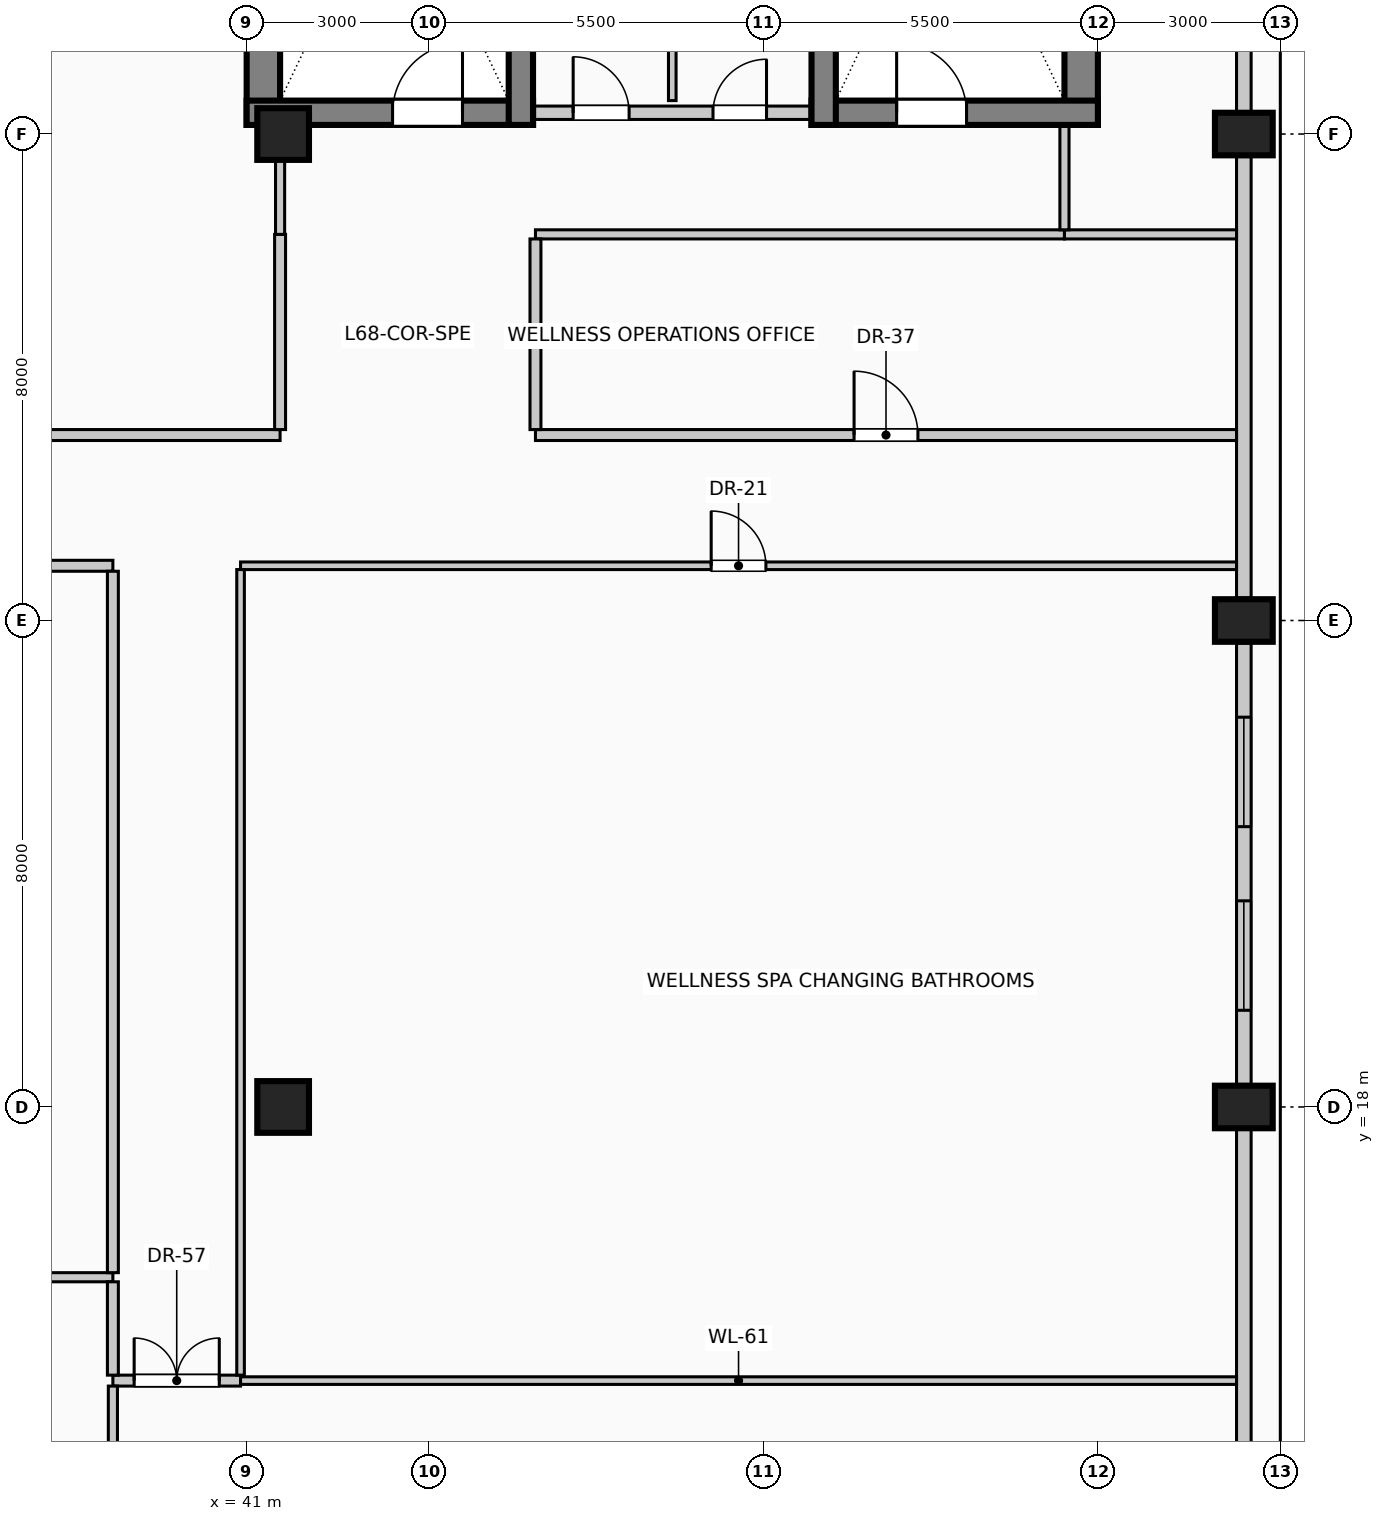
"""IFC4 building model, lengths in metres.
Left out: names, types, materials, properties, quantities, classifications, styles, units other than length and angle.
Written with IfcOpenShell. Run it as: python <this file> out.ifc"""

import sys

from ifc_helpers import new_model, si_unit, direction, frame, frame_2d, origin, origin_2d, place, context, subcontext, project, spatial, rectangle, circle, extrude, element, fill, save


model = new_model("IFC4")
c1 = context("Model", 3, precision=1e-05, world=origin(), true_north=direction((0.0, 1.0)))
c2 = subcontext(c1, "Body", "Model", "MODEL_VIEW")
j1 = project(units=[si_unit("LENGTHUNIT", "METRE"), si_unit("PLANEANGLEUNIT", "RADIAN")], contexts=[c1])
p1 = place(None, origin())
s1 = spatial("IfcSite", under=j1, at=p1, CompositionType="ELEMENT")
p2 = place(p1, origin())
s2 = spatial("IfcBuilding", under=s1, at=p2, CompositionType="ELEMENT")
p3 = place(p2, frame((0.0, 0.0, 280.6)))
s3 = spatial("IfcBuildingStorey", under=s2, at=p3, CompositionType="ELEMENT", Elevation=280.6)
for number, where, z_axis, x_axis in (
    (1, (41.275, 34.15, 0.0), (0.0, 0.0, 1.0), (0.0, 1.0, 0.0)),
    (2, (54.725, 34.15, 0.0), (0.0, 0.0, 1.0), (0.0, 1.0, 0.0)),
):
    element("IfcWall", number, at=place(p3, frame(where, z_axis=z_axis, x_axis=x_axis)), inside=s3, PredefinedType="SHEAR", context=c2, shape_type="SweptSolid", body=[
        extrude(rectangle(XDim=8.83, YDim=0.55, at=frame_2d((4.415, 0.0))), origin(), (0.0, 0.0, 1.0), 4.4),
    ])
p4 = place(p3, frame((41.0, 34.35, 0.0), z_axis=(0.0, 0.0, 1.0), x_axis=(1.0, 0.0, 0.0)))
e3 = element("IfcWall", 3, at=p4, inside=s3, PredefinedType="SHEAR", context=c2, shape_type="SweptSolid", body=[
    extrude(rectangle(XDim=4.71, YDim=0.4, at=frame_2d((2.355, 0.0))), origin(), (0.0, 0.0, 1.0), 4.4),
])
p5 = place(p4, frame((2.4, 0.0, 0.0)))
e4 = element("IfcOpeningElement", 4, at=p5, cuts=e3, PredefinedType="OPENING", context=c2, shape_type="SweptSolid", body=[
    extrude(rectangle(XDim=1.15, YDim=2.2, at=frame_2d((0.575, 1.1))), frame((0.0, 0.21, 0.0), z_axis=(0.0, -1.0, 0.0), x_axis=(1.0, 0.0, 0.0)), (0.0, 0.0, 1.0), 0.42),
])
p6 = place(p3, frame((45.51, 34.15, 0.0), z_axis=(0.0, 0.0, 1.0), x_axis=(0.0, 1.0, 0.0)))
e5 = element("IfcWall", 5, at=p6, inside=s3, PredefinedType="SHEAR", context=c2, shape_type="SweptSolid", body=[
    extrude(rectangle(XDim=8.83, YDim=0.4, at=frame_2d((4.415, 0.0))), origin(), (0.0, 0.0, 1.0), 4.4),
])
p7 = place(p3, frame((50.29, 34.35, 0.0), z_axis=(0.0, 0.0, 1.0), x_axis=(1.0, 0.0, 0.0)))
e6 = element("IfcWall", 6, at=p7, inside=s3, PredefinedType="SHEAR", context=c2, shape_type="SweptSolid", body=[
    extrude(rectangle(XDim=4.71, YDim=0.4, at=frame_2d((2.355, 0.0))), origin(), (0.0, 0.0, 1.0), 4.4),
])
p8 = place(p7, frame((1.4, 0.0, 0.0)))
e7 = element("IfcOpeningElement", 7, at=p8, cuts=e6, PredefinedType="OPENING", context=c2, shape_type="SweptSolid", body=[
    extrude(rectangle(XDim=1.15, YDim=2.2, at=frame_2d((0.575, 1.1))), frame((0.0, 0.21, 0.0), z_axis=(0.0, -1.0, 0.0), x_axis=(1.0, 0.0, 0.0)), (0.0, 0.0, 1.0), 0.42),
])
p9 = place(p3, frame((50.49, 34.15, 0.0), z_axis=(0.0, 0.0, 1.0), x_axis=(0.0, 1.0, 0.0)))
e8 = element("IfcWall", 8, at=p9, inside=s3, PredefinedType="SHEAR", context=c2, shape_type="SweptSolid", body=[
    extrude(rectangle(XDim=8.83, YDim=0.4, at=frame_2d((4.415, 0.0))), origin(), (0.0, 0.0, 1.0), 4.4),
])
for number, where, z_axis, x_axis in (
    (9, (57.4, 18.0, 0.0), (0.0, 0.0, 1.0), (0.0, 1.0, 0.0)),
    (10, (57.4, 26.0, 0.0), (0.0, 0.0, 1.0), (0.0, 1.0, 0.0)),
    (11, (57.4, 34.0, 0.0), (0.0, 0.0, 1.0), (0.0, 1.0, 0.0)),
):
    element("IfcColumn", number, at=place(p3, frame(where, z_axis=z_axis, x_axis=x_axis)), inside=s3, PredefinedType="COLUMN", context=c2, shape_type="SweptSolid", body=[
        extrude(rectangle(XDim=0.7, YDim=0.95, at=origin_2d()), origin(), (0.0, 0.0, 1.0), 4.4),
    ])
for number, where, z_axis, x_axis in (
    (12, (41.6, 18.0, 0.0), (0.0, 0.0, 1.0), (1.0, 0.0, 0.0)),
    (13, (41.6, 34.0, 0.0), (0.0, 0.0, 1.0), (1.0, 0.0, 0.0)),
):
    element("IfcColumn", number, at=place(p3, frame(where, z_axis=z_axis, x_axis=x_axis)), inside=s3, PredefinedType="COLUMN", context=c2, shape_type="SweptSolid", body=[
        extrude(circle(Radius=0.425, at=origin_2d()), origin(), (0.0, 0.0, 1.0), 4.4),
    ])
p10 = place(p3, frame((57.4, 17.63, 0.0), z_axis=(0.0, 0.0, 1.0), x_axis=(0.0, -1.0, 0.0)))
e14 = element("IfcWall", 14, at=p10, inside=s3, PredefinedType="SOLIDWALL", context=c2, shape_type="SweptSolid", body=[
    extrude(rectangle(XDim=7.26, YDim=0.24, at=frame_2d((3.63, 0.0))), origin(), (0.0, 0.0, 1.0), 3.4),
])
p11 = place(p3, frame((57.4, 25.63, 0.0), z_axis=(0.0, 0.0, 1.0), x_axis=(0.0, -1.0, 0.0)))
e15 = element("IfcWall", 15, at=p11, inside=s3, PredefinedType="SOLIDWALL", context=c2, shape_type="SweptSolid", body=[
    extrude(rectangle(XDim=7.26, YDim=0.24, at=frame_2d((3.63, 0.0))), origin(), (0.0, 0.0, 1.0), 3.4),
])
p12 = place(p11, frame((1.22, 0.0, 0.42)))
e16 = element("IfcOpeningElement", 16, at=p12, cuts=e15, PredefinedType="OPENING", context=c2, shape_type="SweptSolid", body=[
    extrude(rectangle(XDim=1.8, YDim=2.2, at=frame_2d((0.9, 1.1))), frame((0.0, 0.13, 0.0), z_axis=(0.0, -1.0, 0.0), x_axis=(1.0, 0.0, 0.0)), (0.0, 0.0, 1.0), 0.26),
])
p13 = place(p11, frame((4.24, 0.0, 0.42)))
e17 = element("IfcOpeningElement", 17, at=p13, cuts=e15, PredefinedType="OPENING", context=c2, shape_type="SweptSolid", body=[
    extrude(rectangle(XDim=1.8, YDim=2.2, at=frame_2d((0.9, 1.1))), frame((0.0, 0.13, 0.0), z_axis=(0.0, -1.0, 0.0), x_axis=(1.0, 0.0, 0.0)), (0.0, 0.0, 1.0), 0.26),
])
p14 = place(p3, frame((57.4, 33.63, 0.0), z_axis=(0.0, 0.0, 1.0), x_axis=(0.0, -1.0, 0.0)))
e18 = element("IfcWall", 18, at=p14, inside=s3, PredefinedType="SOLIDWALL", context=c2, shape_type="SweptSolid", body=[
    extrude(rectangle(XDim=7.26, YDim=0.24, at=frame_2d((3.63, 0.0))), origin(), (0.0, 0.0, 1.0), 3.4),
])
p15 = place(p3, frame((57.4, 42.03, 0.0), z_axis=(0.0, 0.0, 1.0), x_axis=(0.0, -1.0, 0.0)))
e19 = element("IfcWall", 19, at=p15, inside=s3, PredefinedType="SOLIDWALL", context=c2, shape_type="SweptSolid", body=[
    extrude(rectangle(XDim=7.66, YDim=0.24, at=frame_2d((3.83, 0.0))), origin(), (0.0, 0.0, 1.0), 3.4),
])
p16 = place(p3, frame((45.72, 34.35, 0.0), z_axis=(0.0, 0.0, 1.0), x_axis=(1.0, 0.0, 0.0)))
e20 = element("IfcWall", 20, at=p16, inside=s3, PredefinedType="PARTITIONING", context=c2, shape_type="SweptSolid", body=[
    extrude(rectangle(XDim=4.56, YDim=0.22, at=frame_2d((2.28, 0.0))), origin(), (0.0, 0.0, 1.0), 4.15),
])
p17 = place(p16, frame((0.65, 0.0, 0.0)))
e21 = element("IfcOpeningElement", 21, at=p17, cuts=e20, PredefinedType="OPENING", context=c2, shape_type="SweptSolid", body=[
    extrude(rectangle(XDim=0.92, YDim=2.1, at=frame_2d((0.46, 1.05))), frame((0.0, 0.12, 0.0), z_axis=(0.0, -1.0, 0.0), x_axis=(1.0, 0.0, 0.0)), (0.0, 0.0, 1.0), 0.24),
])
p18 = place(p16, frame((2.95, 0.0, 0.0)))
e22 = element("IfcOpeningElement", 22, at=p18, cuts=e20, PredefinedType="OPENING", context=c2, shape_type="SweptSolid", body=[
    extrude(rectangle(XDim=0.88, YDim=2.1, at=frame_2d((0.44, 1.05))), frame((0.0, 0.12, 0.0), z_axis=(0.0, -1.0, 0.0), x_axis=(1.0, 0.0, 0.0)), (0.0, 0.0, 1.0), 0.24),
])
p19 = place(p3, frame((38.8, 13.5, 0.0), z_axis=(0.0, 0.0, 1.0), x_axis=(1.0, 0.0, 0.0)))
e23 = element("IfcWall", 23, at=p19, inside=s3, PredefinedType="PARTITIONING", context=c2, shape_type="SweptSolid", body=[
    extrude(rectangle(XDim=2.1, YDim=0.18, at=frame_2d((1.05, 0.0))), origin(), (0.0, 0.0, 1.0), 4.15),
])
p20 = place(p19, frame((0.35, 0.0, 0.0)))
e24 = element("IfcOpeningElement", 24, at=p20, cuts=e23, PredefinedType="OPENING", context=c2, shape_type="SweptSolid", body=[
    extrude(rectangle(XDim=1.4, YDim=2.2, at=frame_2d((0.7, 1.1))), frame((0.0, 0.1, 0.0), z_axis=(0.0, -1.0, 0.0), x_axis=(1.0, 0.0, 0.0)), (0.0, 0.0, 1.0), 0.2),
])
p21 = place(p3, frame((40.9, 13.5, 0.0), z_axis=(0.0, 0.0, 1.0), x_axis=(1.0, 0.0, 0.0)))
e25 = element("IfcWall", 25, at=p21, inside=s3, PredefinedType="PARTITIONING", context=c2, shape_type="SweptSolid", body=[
    extrude(rectangle(XDim=16.38, YDim=0.125, at=frame_2d((8.19, 0.0))), origin(), (0.0, 0.0, 1.0), 4.15),
])
p22 = place(p3, frame((23.1, 15.2, 0.0), z_axis=(0.0, 0.0, 1.0), x_axis=(1.0, 0.0, 0.0)))
e26 = element("IfcWall", 26, at=p22, inside=s3, PredefinedType="PARTITIONING", context=c2, shape_type="SweptSolid", body=[
    extrude(rectangle(XDim=15.7, YDim=0.15, at=frame_2d((7.85, 0.0))), origin(), (0.0, 0.0, 1.0), 4.15),
])
p23 = place(p3, frame((23.1, 26.9, 0.0), z_axis=(0.0, 0.0, 1.0), x_axis=(1.0, 0.0, 0.0)))
e27 = element("IfcWall", 27, at=p23, inside=s3, PredefinedType="PARTITIONING", context=c2, shape_type="SweptSolid", body=[
    extrude(rectangle(XDim=15.7, YDim=0.18, at=frame_2d((7.85, 0.0))), origin(), (0.0, 0.0, 1.0), 4.15),
])
p24 = place(p23, frame((7.375, 0.0, 0.0)))
e28 = element("IfcOpeningElement", 28, at=p24, cuts=e27, PredefinedType="OPENING", context=c2, shape_type="SweptSolid", body=[
    extrude(rectangle(XDim=0.95, YDim=2.15, at=frame_2d((0.475, 1.075))), frame((0.0, 0.1, 0.0), z_axis=(0.0, -1.0, 0.0), x_axis=(1.0, 0.0, 0.0)), (0.0, 0.0, 1.0), 0.2),
])
p25 = place(p3, frame((40.9, 26.9, 0.0), z_axis=(0.0, 0.0, 1.0), x_axis=(1.0, 0.0, 0.0)))
e29 = element("IfcWall", 29, at=p25, inside=s3, PredefinedType="PARTITIONING", context=c2, shape_type="SweptSolid", body=[
    extrude(rectangle(XDim=16.38, YDim=0.125, at=frame_2d((8.19, 0.0))), origin(), (0.0, 0.0, 1.0), 4.15),
])
p26 = place(p25, frame((7.74, 0.0, 0.0)))
e30 = element("IfcOpeningElement", 30, at=p26, cuts=e29, PredefinedType="OPENING", context=c2, shape_type="SweptSolid", body=[
    extrude(rectangle(XDim=0.9, YDim=2.1, at=frame_2d((0.45, 1.05))), frame((0.0, 0.073, 0.0), z_axis=(0.0, -1.0, 0.0), x_axis=(1.0, 0.0, 0.0)), (0.0, 0.0, 1.0), 0.145),
])
p27 = place(p3, frame((21.0, 29.05, 0.0), z_axis=(0.0, 0.0, 1.0), x_axis=(1.0, 0.0, 0.0)))
e31 = element("IfcWall", 31, at=p27, inside=s3, PredefinedType="PARTITIONING", context=c2, shape_type="SweptSolid", body=[
    extrude(rectangle(XDim=20.55, YDim=0.18, at=frame_2d((10.275, 0.0))), origin(), (0.0, 0.0, 1.0), 4.15),
])
p28 = place(p27, frame((9.8, 0.0, 0.0)))
e32 = element("IfcOpeningElement", 32, at=p28, cuts=e31, PredefinedType="OPENING", context=c2, shape_type="SweptSolid", body=[
    extrude(rectangle(XDim=0.95, YDim=2.15, at=frame_2d((0.475, 1.075))), frame((0.0, 0.1, 0.0), z_axis=(0.0, -1.0, 0.0), x_axis=(1.0, 0.0, 0.0)), (0.0, 0.0, 1.0), 0.2),
])
p29 = place(p3, frame((45.75, 29.05, 0.0), z_axis=(0.0, 0.0, 1.0), x_axis=(1.0, 0.0, 0.0)))
e33 = element("IfcWall", 33, at=p29, inside=s3, PredefinedType="PARTITIONING", context=c2, shape_type="SweptSolid", body=[
    extrude(rectangle(XDim=11.53, YDim=0.18, at=frame_2d((5.765, 0.0))), origin(), (0.0, 0.0, 1.0), 4.15),
])
p30 = place(p29, frame((5.24, 0.0, 0.0)))
e34 = element("IfcOpeningElement", 34, at=p30, cuts=e33, PredefinedType="OPENING", context=c2, shape_type="SweptSolid", body=[
    extrude(rectangle(XDim=1.05, YDim=2.15, at=frame_2d((0.525, 1.075))), frame((0.0, 0.1, 0.0), z_axis=(0.0, -1.0, 0.0), x_axis=(1.0, 0.0, 0.0)), (0.0, 0.0, 1.0), 0.2),
])
p31 = place(p3, frame((45.75, 32.35, 0.0), z_axis=(0.0, 0.0, 1.0), x_axis=(1.0, 0.0, 0.0)))
e35 = element("IfcWall", 35, at=p31, inside=s3, PredefinedType="PARTITIONING", context=c2, shape_type="SweptSolid", body=[
    extrude(rectangle(XDim=8.7, YDim=0.15, at=frame_2d((4.35, 0.0))), origin(), (0.0, 0.0, 1.0), 4.15),
])
p32 = place(p3, frame((54.45, 32.35, 0.0), z_axis=(0.0, 0.0, 1.0), x_axis=(1.0, 0.0, 0.0)))
e36 = element("IfcWall", 36, at=p32, inside=s3, PredefinedType="PARTITIONING", context=c2, shape_type="SweptSolid", body=[
    extrude(rectangle(XDim=2.83, YDim=0.15, at=frame_2d((1.415, 0.0))), origin(), (0.0, 0.0, 1.0), 4.15),
])
p33 = place(p3, frame((38.8, 0.6, 0.0), z_axis=(0.0, 0.0, 1.0), x_axis=(0.0, 1.0, 0.0)))
e37 = element("IfcWall", 37, at=p33, inside=s3, PredefinedType="PARTITIONING", context=c2, shape_type="SweptSolid", body=[
    extrude(rectangle(XDim=12.81, YDim=0.15, at=frame_2d((6.405, 0.0))), origin(), (0.0, 0.0, 1.0), 4.15),
])
p34 = place(p3, frame((38.8, 13.59, 0.0), z_axis=(0.0, 0.0, 1.0), x_axis=(0.0, 1.0, 0.0)))
e38 = element("IfcWall", 38, at=p34, inside=s3, PredefinedType="PARTITIONING", context=c2, shape_type="SweptSolid", body=[
    extrude(rectangle(XDim=1.535, YDim=0.18, at=frame_2d((0.768, 0.0))), origin(), (0.0, 0.0, 1.0), 4.15),
])
p35 = place(p3, frame((38.8, 15.275, 0.0), z_axis=(0.0, 0.0, 1.0), x_axis=(0.0, 1.0, 0.0)))
e39 = element("IfcWall", 39, at=p35, inside=s3, PredefinedType="PARTITIONING", context=c2, shape_type="SweptSolid", body=[
    extrude(rectangle(XDim=11.535, YDim=0.18, at=frame_2d((5.768, 0.0))), origin(), (0.0, 0.0, 1.0), 4.15),
])
p36 = place(p3, frame((40.9, 13.59, 0.0), z_axis=(0.0, 0.0, 1.0), x_axis=(0.0, 1.0, 0.0)))
e40 = element("IfcWall", 40, at=p36, inside=s3, PredefinedType="PARTITIONING", context=c2, shape_type="SweptSolid", body=[
    extrude(rectangle(XDim=13.247, YDim=0.125, at=frame_2d((6.624, 0.0))), origin(), (0.0, 0.0, 1.0), 4.15),
])
p37 = place(p3, frame((41.55, 29.14, 0.0), z_axis=(0.0, 0.0, 1.0), x_axis=(0.0, 1.0, 0.0)))
e41 = element("IfcWall", 41, at=p37, inside=s3, PredefinedType="PARTITIONING", context=c2, shape_type="SweptSolid", body=[
    extrude(rectangle(XDim=3.21, YDim=0.18, at=frame_2d((1.605, 0.0))), origin(), (0.0, 0.0, 1.0), 3.595),
])
p38 = place(p3, frame((41.55, 32.35, 0.0), z_axis=(0.0, 0.0, 1.0), x_axis=(0.0, 1.0, 0.0)))
e42 = element("IfcWall", 42, at=p38, inside=s3, PredefinedType="PARTITIONING", context=c2, shape_type="SweptSolid", body=[
    extrude(rectangle(XDim=1.225, YDim=0.15, at=frame_2d((0.612, 0.0))), origin(), (0.0, 0.0, 1.0), 3.595),
])
p39 = place(p3, frame((45.75, 29.14, 0.0), z_axis=(0.0, 0.0, 1.0), x_axis=(0.0, 1.0, 0.0)))
e43 = element("IfcWall", 43, at=p39, inside=s3, PredefinedType="PARTITIONING", context=c2, shape_type="SweptSolid", body=[
    extrude(rectangle(XDim=3.135, YDim=0.18, at=frame_2d((1.567, 0.0))), origin(), (0.0, 0.0, 1.0), 4.15),
])
p40 = place(p3, frame((48.0, 34.55, 0.0), z_axis=(0.0, 0.0, 1.0), x_axis=(0.0, 1.0, 0.0)))
e44 = element("IfcWall", 44, at=p40, inside=s3, PredefinedType="PARTITIONING", context=c2, shape_type="SweptSolid", body=[
    extrude(rectangle(XDim=7.475, YDim=0.125, at=frame_2d((3.737, 0.0))), origin(), (0.0, 0.0, 1.0), 4.15),
])
p41 = place(p3, frame((54.45, 32.425, 0.0), z_axis=(0.0, 0.0, 1.0), x_axis=(0.0, 1.0, 0.0)))
e45 = element("IfcWall", 45, at=p41, inside=s3, PredefinedType="PARTITIONING", context=c2, shape_type="SweptSolid", body=[
    extrude(rectangle(XDim=1.725, YDim=0.15, at=frame_2d((0.862, 0.0))), origin(), (0.0, 0.0, 1.0), 4.15),
])
p42 = place(p12, origin())
e46 = element("IfcWindow", 46, at=p42, inside=s3, PartitioningType="SINGLE_PANEL", PredefinedType="WINDOW", context=c2, shape_type="SweptSolid", body=[
    extrude(rectangle(XDim=1.8, YDim=2.2, at=frame_2d((0.9, 1.1))), frame((0.0, 0.03, 0.0), z_axis=(0.0, -1.0, 0.0), x_axis=(1.0, 0.0, 0.0)), (0.0, 0.0, 1.0), 0.06),
])
fill(e16, e46)
p43 = place(p13, origin())
e47 = element("IfcWindow", 47, at=p43, inside=s3, PartitioningType="SINGLE_PANEL", PredefinedType="WINDOW", context=c2, shape_type="SweptSolid", body=[
    extrude(rectangle(XDim=1.8, YDim=2.2, at=frame_2d((0.9, 1.1))), frame((0.0, 0.03, 0.0), z_axis=(0.0, -1.0, 0.0), x_axis=(1.0, 0.0, 0.0)), (0.0, 0.0, 1.0), 0.06),
])
fill(e17, e47)
p44 = place(p5, origin())
e48 = element("IfcDoor", 48, at=p44, inside=s3, OperationType="SINGLE_SWING_RIGHT", PredefinedType="DOOR", context=c2, shape_type="SweptSolid", body=[
    extrude(rectangle(XDim=1.15, YDim=2.2, at=frame_2d((0.575, 1.1))), frame((0.0, 0.025, 0.0), z_axis=(0.0, -1.0, 0.0), x_axis=(1.0, 0.0, 0.0)), (0.0, 0.0, 1.0), 0.05),
])
fill(e4, e48)
p45 = place(p17, origin())
e49 = element("IfcDoor", 49, at=p45, inside=s3, OperationType="SINGLE_SWING_LEFT", PredefinedType="DOOR", context=c2, shape_type="SweptSolid", body=[
    extrude(rectangle(XDim=0.92, YDim=2.1, at=frame_2d((0.46, 1.05))), frame((0.0, 0.025, 0.0), z_axis=(0.0, -1.0, 0.0), x_axis=(1.0, 0.0, 0.0)), (0.0, 0.0, 1.0), 0.05),
])
fill(e21, e49)
p46 = place(p18, origin())
e50 = element("IfcDoor", 50, at=p46, inside=s3, OperationType="SINGLE_SWING_RIGHT", PredefinedType="DOOR", context=c2, shape_type="SweptSolid", body=[
    extrude(rectangle(XDim=0.88, YDim=2.1, at=frame_2d((0.44, 1.05))), frame((0.0, 0.025, 0.0), z_axis=(0.0, -1.0, 0.0), x_axis=(1.0, 0.0, 0.0)), (0.0, 0.0, 1.0), 0.05),
])
fill(e22, e50)
p47 = place(p8, origin())
e51 = element("IfcDoor", 51, at=p47, inside=s3, OperationType="SINGLE_SWING_LEFT", PredefinedType="DOOR", context=c2, shape_type="SweptSolid", body=[
    extrude(rectangle(XDim=1.15, YDim=2.2, at=frame_2d((0.575, 1.1))), frame((0.0, 0.025, 0.0), z_axis=(0.0, -1.0, 0.0), x_axis=(1.0, 0.0, 0.0)), (0.0, 0.0, 1.0), 0.05),
])
fill(e7, e51)
p48 = place(p20, origin())
e52 = element("IfcDoor", 52, at=p48, inside=s3, OperationType="DOUBLE_DOOR_SINGLE_SWING", PredefinedType="DOOR", context=c2, shape_type="SweptSolid", body=[
    extrude(rectangle(XDim=1.4, YDim=2.2, at=frame_2d((0.7, 1.1))), frame((0.0, 0.025, 0.0), z_axis=(0.0, -1.0, 0.0), x_axis=(1.0, 0.0, 0.0)), (0.0, 0.0, 1.0), 0.05),
])
fill(e24, e52)
p49 = place(p26, origin())
e53 = element("IfcDoor", 53, at=p49, inside=s3, OperationType="SINGLE_SWING_LEFT", PredefinedType="DOOR", context=c2, shape_type="SweptSolid", body=[
    extrude(rectangle(XDim=0.9, YDim=2.1, at=frame_2d((0.45, 1.05))), frame((0.0, 0.025, 0.0), z_axis=(0.0, -1.0, 0.0), x_axis=(1.0, 0.0, 0.0)), (0.0, 0.0, 1.0), 0.05),
])
fill(e30, e53)
p50 = place(p30, origin())
e54 = element("IfcDoor", 54, at=p50, inside=s3, OperationType="SINGLE_SWING_LEFT", PredefinedType="DOOR", context=c2, shape_type="SweptSolid", body=[
    extrude(rectangle(XDim=1.05, YDim=2.15, at=frame_2d((0.525, 1.075))), frame((0.0, 0.025, 0.0), z_axis=(0.0, -1.0, 0.0), x_axis=(1.0, 0.0, 0.0)), (0.0, 0.0, 1.0), 0.05),
])
fill(e34, e54)
save(model, sys.argv[1])
